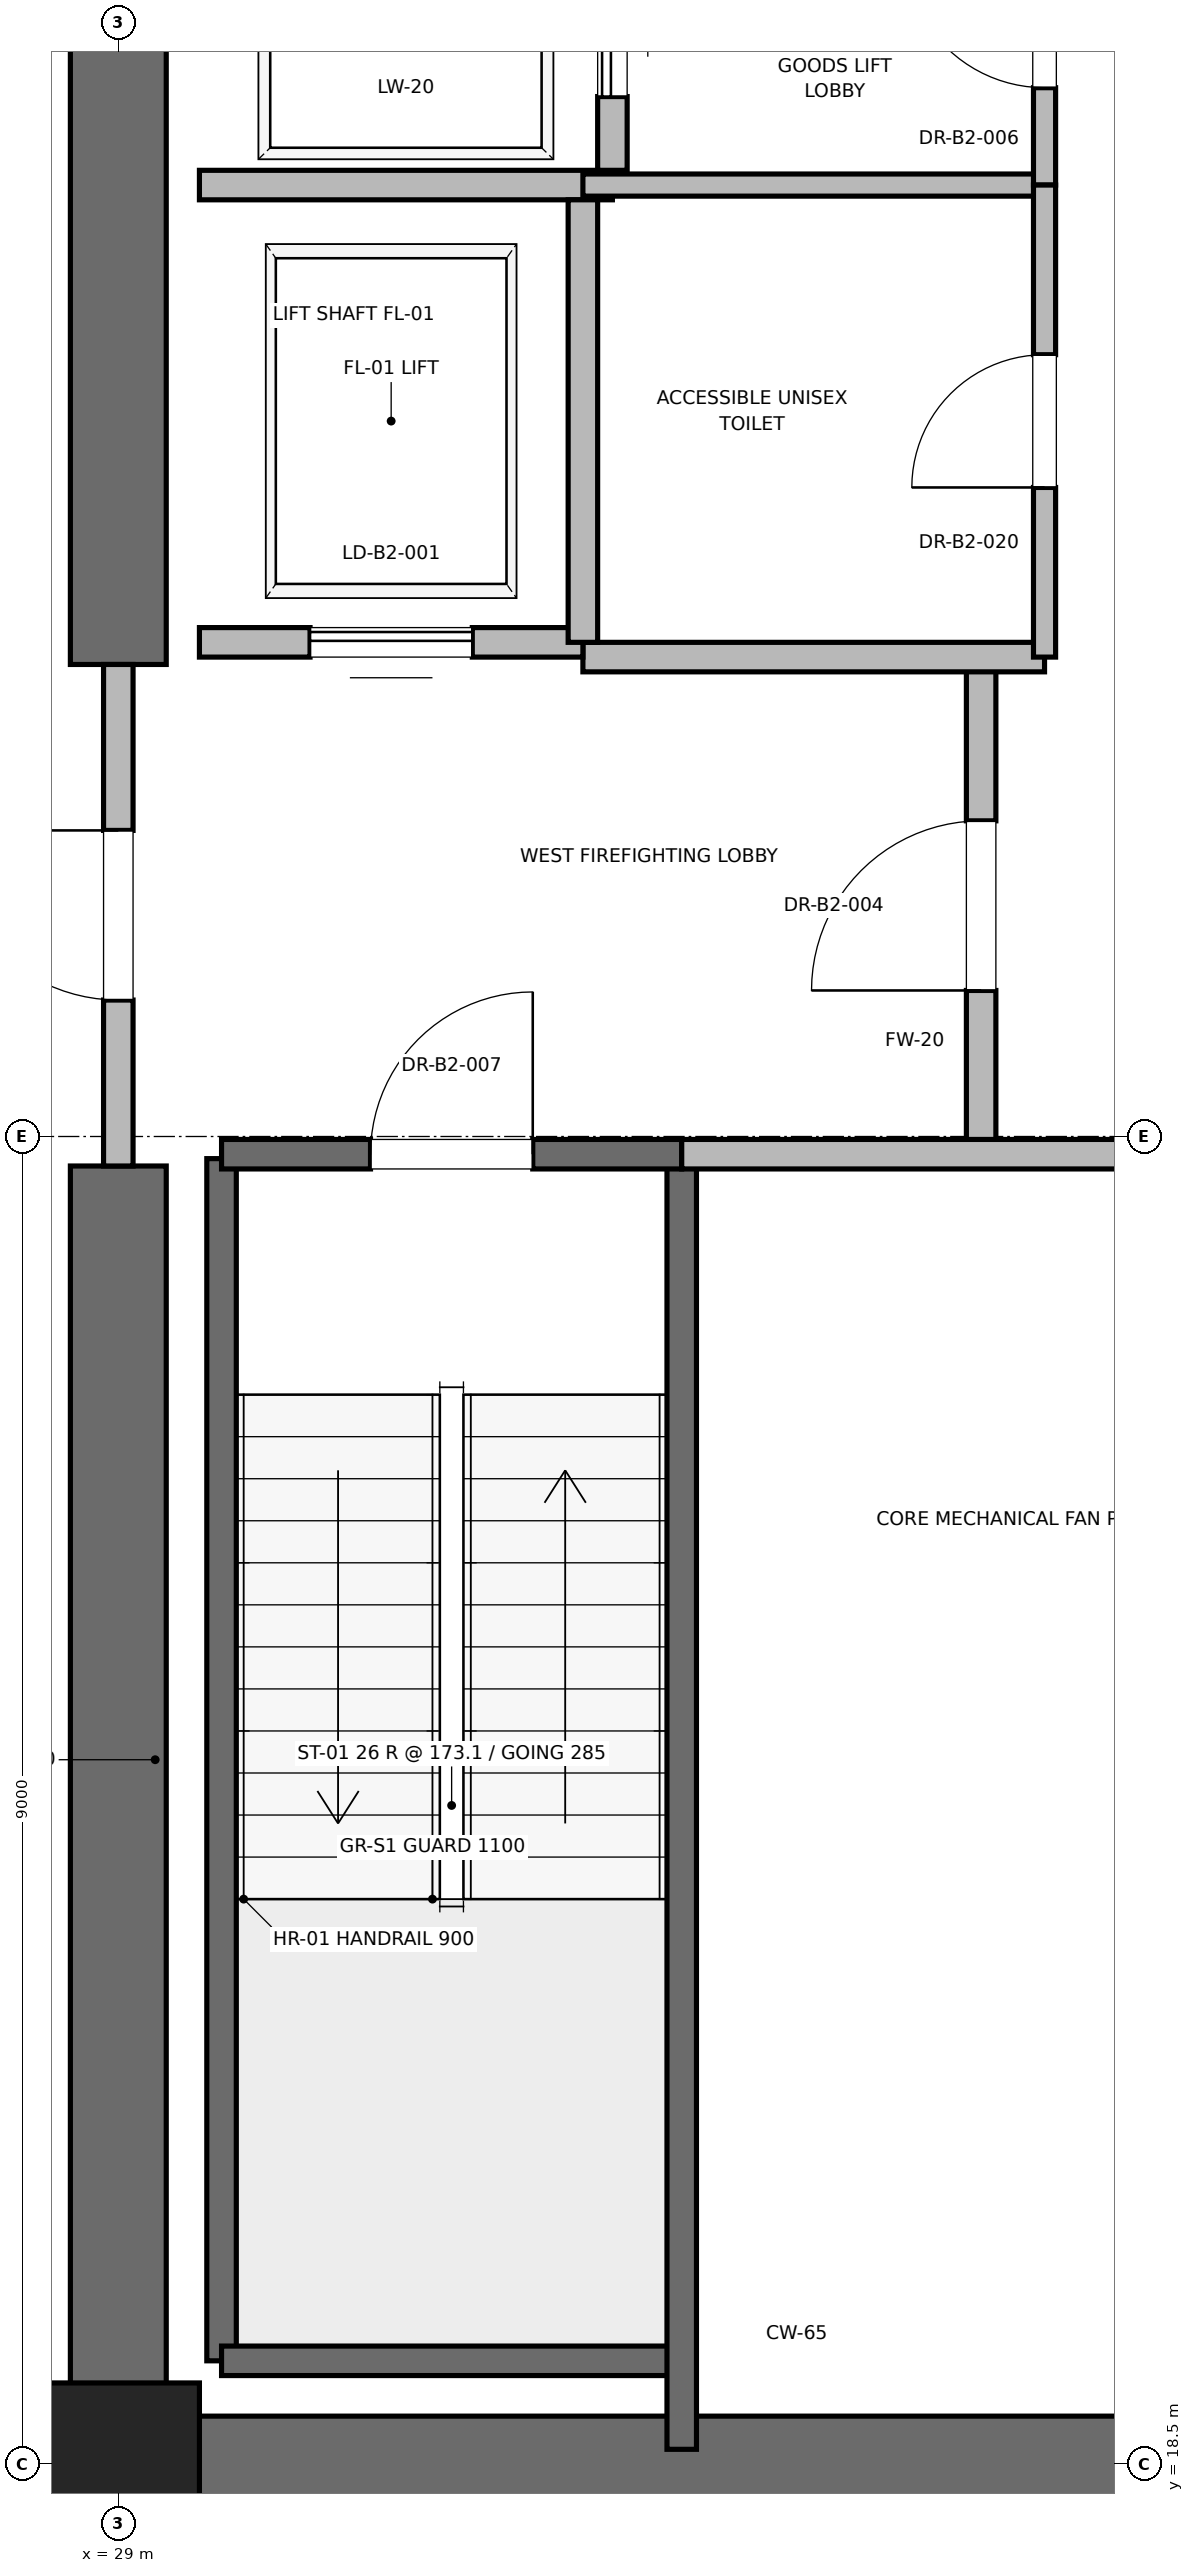
"""IFC4 building model, lengths in metres.
Left out: names, types, materials, properties, quantities, classifications, styles, units other than length and angle.
Written with IfcOpenShell. Run it as: python <this file> out.ifc"""

import sys

from ifc_helpers import new_model, si_unit, direction, frame, frame_2d, origin, origin_2d, place, context, subcontext, project, spatial, rectangle, extrude, element, fill, save


model = new_model("IFC4")
c1 = context("Model", 3, precision=1e-05, world=origin(), true_north=direction((0.0, 1.0)))
c2 = subcontext(c1, "Body", "Model", "MODEL_VIEW")
j1 = project(units=[si_unit("LENGTHUNIT", "METRE"), si_unit("PLANEANGLEUNIT", "RADIAN")], contexts=[c1])
p1 = place(None, origin())
s1 = spatial("IfcSite", under=j1, at=p1, CompositionType="ELEMENT")
p2 = place(p1, origin())
s2 = spatial("IfcBuilding", under=s1, at=p2, CompositionType="ELEMENT")
p3 = place(p2, frame((0.0, 0.0, -9.0)))
s3 = spatial("IfcBuildingStorey", under=s2, at=p3, CompositionType="ELEMENT", Elevation=-9.0)
p4 = place(p3, frame((29.0, 18.5, -0.3), z_axis=(0.0, 0.0, 1.0), x_axis=(1.0, 0.0, 0.0)))
e1 = element("IfcColumn", 1, at=p4, inside=s3, PredefinedType="PILASTER", context=c2, shape_type="SweptSolid", body=[
    extrude(rectangle(XDim=1.1, YDim=1.1, at=origin_2d()), origin(), (0.0, 0.0, 1.0), 4.8),
])
p5 = place(p3, frame((29.0, 18.5, -0.3), z_axis=(0.0, 0.0, 1.0), x_axis=(1.0, 0.0, 0.0)))
e2 = element("IfcWall", 2, at=p5, inside=s3, PredefinedType="SHEAR", context=c2, shape_type="SweptSolid", body=[
    extrude(rectangle(XDim=9.2, YDim=0.65, at=frame_2d((4.6, 0.0))), origin(), (0.0, 0.0, 1.0), 4.5),
])
p6 = place(p3, frame((29.0, 18.5, -0.3), z_axis=(0.0, 0.0, 1.0), x_axis=(0.0, 1.0, 0.0)))
e3 = element("IfcWall", 3, at=p6, inside=s3, PredefinedType="SHEAR", context=c2, shape_type="SweptSolid", body=[
    extrude(rectangle(XDim=8.8, YDim=0.65, at=frame_2d((4.4, 0.0))), origin(), (0.0, 0.0, 1.0), 4.5),
])
p7 = place(p3, frame((29.0, 30.7, -0.3), z_axis=(0.0, 0.0, 1.0), x_axis=(0.0, 1.0, 0.0)))
e4 = element("IfcWall", 4, at=p7, inside=s3, PredefinedType="SHEAR", context=c2, shape_type="SweptSolid", body=[
    extrude(rectangle(XDim=5.8, YDim=0.65, at=frame_2d((2.9, 0.0))), origin(), (0.0, 0.0, 1.0), 4.5),
])
p8 = place(p3, frame((29.7, 19.2, -0.3), z_axis=(0.0, 0.0, 1.0), x_axis=(0.0, 1.0, 0.0)))
e5 = element("IfcWall", 5, at=p8, inside=s3, PredefinedType="SOLIDWALL", context=c2, shape_type="SweptSolid", body=[
    extrude(rectangle(XDim=8.15, YDim=0.2, at=frame_2d((4.075, 0.0))), origin(), (0.0, 0.0, 1.0), 4.5),
])
p9 = place(p3, frame((29.7, 19.2, -0.3), z_axis=(0.0, 0.0, 1.0), x_axis=(1.0, 0.0, 0.0)))
e6 = element("IfcWall", 6, at=p9, inside=s3, PredefinedType="SOLIDWALL", context=c2, shape_type="SweptSolid", body=[
    extrude(rectangle(XDim=3.12, YDim=0.2, at=frame_2d((1.56, 0.0))), origin(), (0.0, 0.0, 1.0), 4.5),
])
p10 = place(p3, frame((32.82, 18.6, -0.3), z_axis=(0.0, 0.0, 1.0), x_axis=(0.0, 1.0, 0.0)))
e7 = element("IfcWall", 7, at=p10, inside=s3, PredefinedType="SOLIDWALL", context=c2, shape_type="SweptSolid", body=[
    extrude(rectangle(XDim=8.78, YDim=0.2, at=frame_2d((4.39, 0.0))), origin(), (0.0, 0.0, 1.0), 4.5),
])
p11 = place(p3, frame((29.7, 27.38, -0.3), z_axis=(0.0, 0.0, 1.0), x_axis=(1.0, 0.0, 0.0)))
e8 = element("IfcWall", 8, at=p11, inside=s3, PredefinedType="SOLIDWALL", context=c2, shape_type="SweptSolid", body=[
    extrude(rectangle(XDim=3.12, YDim=0.2, at=frame_2d((1.56, 0.0))), origin(), (0.0, 0.0, 1.0), 4.5),
])
p12 = place(p11, frame((1.01, 0.0, 0.3)))
e9 = element("IfcOpeningElement", 9, at=p12, cuts=e8, PredefinedType="OPENING", context=c2, shape_type="SweptSolid", body=[
    extrude(rectangle(XDim=1.1, YDim=2.15, at=frame_2d((0.55, 1.075))), frame((0.0, 0.1, 0.0), z_axis=(0.0, -1.0, 0.0), x_axis=(1.0, 0.0, 0.0)), (0.0, 0.0, 1.0), 0.2),
])
p13 = place(p3, frame((34.85, 27.38, 0.0), z_axis=(0.0, 0.0, 1.0), x_axis=(0.0, 1.0, 0.0)))
e10 = element("IfcWall", 10, at=p13, inside=s3, PredefinedType="PARTITIONING", context=c2, shape_type="SweptSolid", body=[
    extrude(rectangle(XDim=3.37, YDim=0.2, at=frame_2d((1.685, 0.0))), origin(), (0.0, 0.0, 1.0), 4.2),
])
p14 = place(p13, frame((1.11, 0.0, 0.0)))
e11 = element("IfcOpeningElement", 11, at=p14, cuts=e10, PredefinedType="OPENING", context=c2, shape_type="SweptSolid", body=[
    extrude(rectangle(XDim=1.15, YDim=2.2, at=frame_2d((0.575, 1.1))), frame((0.0, 0.1, 0.0), z_axis=(0.0, -1.0, 0.0), x_axis=(1.0, 0.0, 0.0)), (0.0, 0.0, 1.0), 0.2),
])
p15 = place(p3, frame((29.0, 27.3, 0.0), z_axis=(0.0, 0.0, 1.0), x_axis=(0.0, 1.0, 0.0)))
e12 = element("IfcWall", 12, at=p15, inside=s3, PredefinedType="PARTITIONING", context=c2, shape_type="SweptSolid", body=[
    extrude(rectangle(XDim=3.4, YDim=0.2, at=frame_2d((1.7, 0.0))), origin(), (0.0, 0.0, 1.0), 2.98),
])
p16 = place(p15, frame((1.125, 0.0, 0.0)))
e13 = element("IfcOpeningElement", 13, at=p16, cuts=e12, PredefinedType="OPENING", context=c2, shape_type="SweptSolid", body=[
    extrude(rectangle(XDim=1.15, YDim=2.2, at=frame_2d((0.575, 1.1))), frame((0.0, 0.1, 0.0), z_axis=(0.0, -1.0, 0.0), x_axis=(1.0, 0.0, 0.0)), (0.0, 0.0, 1.0), 0.2),
])
p17 = place(p3, frame((32.82, 27.38, 0.0), z_axis=(0.0, 0.0, 1.0), x_axis=(1.0, 0.0, 0.0)))
e14 = element("IfcWall", 14, at=p17, inside=s3, PredefinedType="PARTITIONING", context=c2, shape_type="SweptSolid", body=[
    extrude(rectangle(XDim=5.62, YDim=0.2, at=frame_2d((2.81, 0.0))), origin(), (0.0, 0.0, 1.0), 4.2),
])
p18 = place(p3, frame((32.15, 30.75, 0.0), z_axis=(0.0, 0.0, 1.0), x_axis=(1.0, 0.0, 0.0)))
e15 = element("IfcWall", 15, at=p18, inside=s3, PredefinedType="PARTITIONING", context=c2, shape_type="SweptSolid", body=[
    extrude(rectangle(XDim=3.13, YDim=0.2, at=frame_2d((1.565, 0.0))), origin(), (0.0, 0.0, 1.0), 4.2),
])
p19 = place(p3, frame((29.55, 30.85, 0.0), z_axis=(0.0, 0.0, 1.0), x_axis=(1.0, 0.0, 0.0)))
e16 = element("IfcWall", 16, at=p19, inside=s3, PredefinedType="SOLIDWALL", context=c2, shape_type="SweptSolid", body=[
    extrude(rectangle(XDim=2.6, YDim=0.2, at=frame_2d((1.3, 0.0))), origin(), (0.0, 0.0, 1.0), 2.98),
])
p20 = place(p19, frame((0.75, 0.0, 0.0)))
e17 = element("IfcOpeningElement", 17, at=p20, cuts=e16, PredefinedType="OPENING", context=c2, shape_type="SweptSolid", body=[
    extrude(rectangle(XDim=1.1, YDim=2.2, at=frame_2d((0.55, 1.1))), frame((0.0, 0.1, 0.0), z_axis=(0.0, -1.0, 0.0), x_axis=(1.0, 0.0, 0.0)), (0.0, 0.0, 1.0), 0.2),
])
p21 = place(p3, frame((29.55, 33.95, 0.0), z_axis=(0.0, 0.0, 1.0), x_axis=(1.0, 0.0, 0.0)))
e18 = element("IfcWall", 18, at=p21, inside=s3, PredefinedType="SOLIDWALL", context=c2, shape_type="SweptSolid", body=[
    extrude(rectangle(XDim=2.8, YDim=0.2, at=frame_2d((1.4, 0.0))), origin(), (0.0, 0.0, 1.0), 4.2),
])
p22 = place(p3, frame((32.15, 30.85, 0.0), z_axis=(0.0, 0.0, 1.0), x_axis=(0.0, 1.0, 0.0)))
e19 = element("IfcWall", 19, at=p22, inside=s3, PredefinedType="SOLIDWALL", context=c2, shape_type="SweptSolid", body=[
    extrude(rectangle(XDim=3.0, YDim=0.2, at=frame_2d((1.5, 0.0))), origin(), (0.0, 0.0, 1.0), 4.2),
])
p23 = place(p3, frame((32.35, 34.05, 0.0), z_axis=(0.0, 0.0, 1.0), x_axis=(0.0, 1.0, 0.0)))
e20 = element("IfcWall", 20, at=p23, inside=s3, PredefinedType="SOLIDWALL", context=c2, shape_type="SweptSolid", body=[
    extrude(rectangle(XDim=2.1, YDim=0.2, at=frame_2d((1.05, 0.0))), origin(), (0.0, 0.0, 1.0), 4.2),
])
p24 = place(p23, frame((0.5, 0.0, 0.0)))
e21 = element("IfcOpeningElement", 21, at=p24, cuts=e20, PredefinedType="OPENING", context=c2, shape_type="SweptSolid", body=[
    extrude(rectangle(XDim=1.1, YDim=2.2, at=frame_2d((0.55, 1.1))), frame((0.0, 0.1, 0.0), z_axis=(0.0, -1.0, 0.0), x_axis=(1.0, 0.0, 0.0)), (0.0, 0.0, 1.0), 0.2),
])
p25 = place(p3, frame((32.15, 33.95, 0.0), z_axis=(0.0, 0.0, 1.0), x_axis=(1.0, 0.0, 0.0)))
e22 = element("IfcWall", 22, at=p25, inside=s3, PredefinedType="PARTITIONING", context=c2, shape_type="SweptSolid", body=[
    extrude(rectangle(XDim=3.13, YDim=0.15, at=frame_2d((1.565, 0.0))), origin(), (0.0, 0.0, 1.0), 2.85),
])
p26 = place(p3, frame((35.28, 33.95, 0.0), z_axis=(0.0, 0.0, 1.0), x_axis=(0.0, 1.0, 0.0)))
e23 = element("IfcWall", 23, at=p26, inside=s3, PredefinedType="PARTITIONING", context=c2, shape_type="SweptSolid", body=[
    extrude(rectangle(XDim=2.27, YDim=0.15, at=frame_2d((1.135, 0.0))), origin(), (0.0, 0.0, 1.0), 2.85),
])
p27 = place(p26, frame((0.66, 0.0, 0.0)))
e24 = element("IfcOpeningElement", 24, at=p27, cuts=e23, PredefinedType="OPENING", context=c2, shape_type="SweptSolid", body=[
    extrude(rectangle(XDim=0.95, YDim=2.15, at=frame_2d((0.475, 1.075))), frame((0.0, 0.075, 0.0), z_axis=(0.0, -1.0, 0.0), x_axis=(1.0, 0.0, 0.0)), (0.0, 0.0, 1.0), 0.15),
])
p28 = place(p3, frame((35.28, 30.75, 0.0), z_axis=(0.0, 0.0, 1.0), x_axis=(0.0, 1.0, 0.0)))
e25 = element("IfcWall", 25, at=p28, inside=s3, PredefinedType="PARTITIONING", context=c2, shape_type="SweptSolid", body=[
    extrude(rectangle(XDim=3.2, YDim=0.15, at=frame_2d((1.6, 0.0))), origin(), (0.0, 0.0, 1.0), 2.85),
])
p29 = place(p28, frame((1.15, 0.0, 0.0)))
e26 = element("IfcOpeningElement", 26, at=p29, cuts=e25, PredefinedType="OPENING", context=c2, shape_type="SweptSolid", body=[
    extrude(rectangle(XDim=0.9, YDim=2.1, at=frame_2d((0.45, 1.05))), frame((0.0, 0.075, 0.0), z_axis=(0.0, -1.0, 0.0), x_axis=(1.0, 0.0, 0.0)), (0.0, 0.0, 1.0), 0.15),
])
p30 = place(p12, origin())
e27 = element("IfcDoor", 27, at=p30, inside=s3, OperationType="SINGLE_SWING_RIGHT", PredefinedType="DOOR", context=c2, shape_type="SweptSolid", body=[
    extrude(rectangle(XDim=1.1, YDim=2.15, at=frame_2d((0.55, 1.075))), frame((0.0, 0.025, 0.0), z_axis=(0.0, -1.0, 0.0), x_axis=(1.0, 0.0, 0.0)), (0.0, 0.0, 1.0), 0.05),
])
fill(e9, e27)
p31 = place(p14, origin())
e28 = element("IfcDoor", 28, at=p31, inside=s3, OperationType="SINGLE_SWING_LEFT", PredefinedType="DOOR", context=c2, shape_type="SweptSolid", body=[
    extrude(rectangle(XDim=1.15, YDim=2.2, at=frame_2d((0.575, 1.1))), frame((0.0, 0.025, 0.0), z_axis=(0.0, -1.0, 0.0), x_axis=(1.0, 0.0, 0.0)), (0.0, 0.0, 1.0), 0.05),
])
fill(e11, e28)
p32 = place(p16, origin())
e29 = element("IfcDoor", 29, at=p32, inside=s3, OperationType="SINGLE_SWING_RIGHT", PredefinedType="DOOR", context=c2, shape_type="SweptSolid", body=[
    extrude(rectangle(XDim=1.15, YDim=2.2, at=frame_2d((0.575, 1.1))), frame((0.0, 0.025, 0.0), z_axis=(0.0, -1.0, 0.0), x_axis=(1.0, 0.0, 0.0)), (0.0, 0.0, 1.0), 0.05),
])
fill(e13, e29)
p33 = place(p20, origin())
e30 = element("IfcDoor", 30, at=p33, inside=s3, OperationType="SLIDING_TO_RIGHT", PredefinedType="DOOR", context=c2, shape_type="SweptSolid", body=[
    extrude(rectangle(XDim=1.1, YDim=2.2, at=frame_2d((0.55, 1.1))), frame((0.0, 0.025, 0.0), z_axis=(0.0, -1.0, 0.0), x_axis=(1.0, 0.0, 0.0)), (0.0, 0.0, 1.0), 0.05),
])
fill(e17, e30)
p34 = place(p24, origin())
e31 = element("IfcDoor", 31, at=p34, inside=s3, OperationType="SLIDING_TO_RIGHT", PredefinedType="DOOR", context=c2, shape_type="SweptSolid", body=[
    extrude(rectangle(XDim=1.1, YDim=2.2, at=frame_2d((0.55, 1.1))), frame((0.0, 0.025, 0.0), z_axis=(0.0, -1.0, 0.0), x_axis=(1.0, 0.0, 0.0)), (0.0, 0.0, 1.0), 0.05),
])
fill(e21, e31)
p35 = place(p27, origin())
e32 = element("IfcDoor", 32, at=p35, inside=s3, OperationType="SINGLE_SWING_RIGHT", PredefinedType="DOOR", context=c2, shape_type="SweptSolid", body=[
    extrude(rectangle(XDim=0.95, YDim=2.15, at=frame_2d((0.475, 1.075))), frame((0.0, 0.025, 0.0), z_axis=(0.0, -1.0, 0.0), x_axis=(1.0, 0.0, 0.0)), (0.0, 0.0, 1.0), 0.05),
])
fill(e24, e32)
p36 = place(p29, origin())
e33 = element("IfcDoor", 33, at=p36, inside=s3, OperationType="SINGLE_SWING_LEFT", PredefinedType="DOOR", context=c2, shape_type="SweptSolid", body=[
    extrude(rectangle(XDim=0.9, YDim=2.1, at=frame_2d((0.45, 1.05))), frame((0.0, 0.025, 0.0), z_axis=(0.0, -1.0, 0.0), x_axis=(1.0, 0.0, 0.0)), (0.0, 0.0, 1.0), 0.05),
])
fill(e26, e33)
save(model, sys.argv[1])
